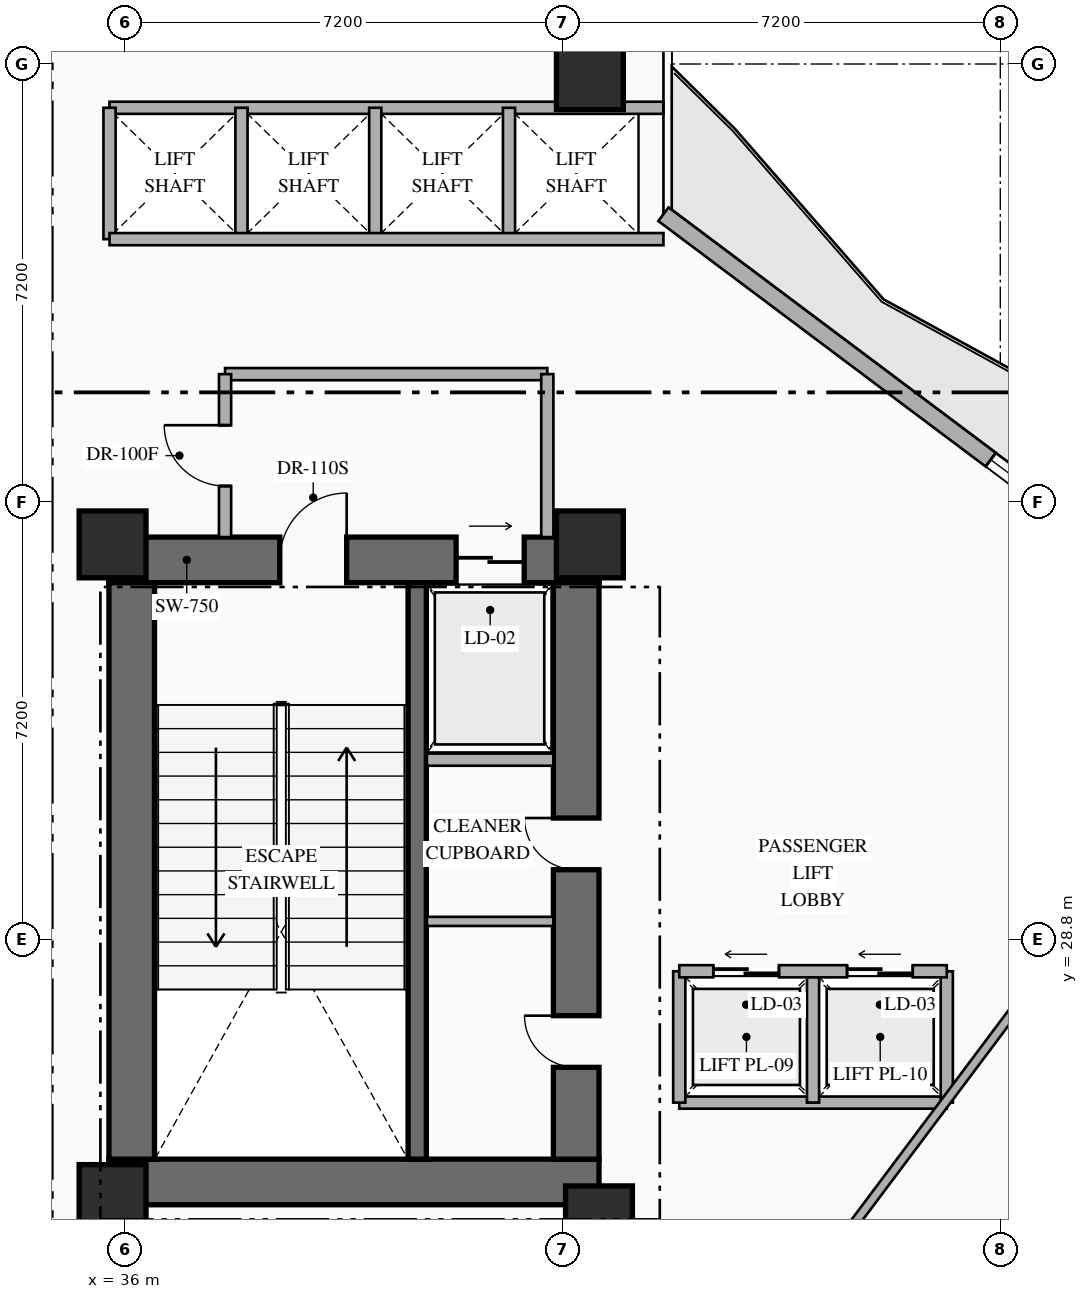
"""IFC4 building model, lengths in metres.
Left out: names, types, materials, properties, quantities, classifications, styles, units other than length and angle.
Written with IfcOpenShell. Run it as: python <this file> out.ifc"""

import sys

from ifc_helpers import new_model, si_unit, direction, frame, frame_2d, origin, origin_2d, place, context, subcontext, project, spatial, rectangle, extrude, element, fill, save


model = new_model("IFC4")
c1 = context("Model", 3, precision=1e-05, world=origin(), true_north=direction((0.0, 1.0)))
c2 = subcontext(c1, "Body", "Model", "MODEL_VIEW")
j1 = project(units=[si_unit("LENGTHUNIT", "METRE"), si_unit("PLANEANGLEUNIT", "RADIAN")], contexts=[c1])
p1 = place(None, origin())
s1 = spatial("IfcSite", under=j1, at=p1, CompositionType="ELEMENT")
p2 = place(p1, origin())
s2 = spatial("IfcBuilding", under=s1, at=p2, CompositionType="ELEMENT")
p3 = place(p2, frame((0.0, 0.0, 32.1)))
s3 = spatial("IfcBuildingStorey", under=s2, at=p3, CompositionType="ELEMENT", Elevation=32.1)
p4 = place(p3, frame((35.74, 24.815, 0.0), z_axis=(0.0, 0.0, 1.0), x_axis=(1.0, 0.0, 0.0)))
e1 = element("IfcWall", 1, at=p4, inside=s3, PredefinedType="SHEAR", context=c2, shape_type="SweptSolid", body=[
    extrude(rectangle(XDim=8.06, YDim=0.75, at=frame_2d((4.03, 0.0))), origin(), (0.0, 0.0, 1.0), 4.5),
])
p5 = place(p3, frame((35.74, 35.045, 0.0), z_axis=(0.0, 0.0, 1.0), x_axis=(1.0, 0.0, 0.0)))
e2 = element("IfcWall", 2, at=p5, inside=s3, PredefinedType="SHEAR", context=c2, shape_type="SweptSolid", body=[
    extrude(rectangle(XDim=8.06, YDim=0.75, at=frame_2d((4.03, 0.0))), origin(), (0.0, 0.0, 1.0), 4.5),
])
p6 = place(p5, frame((2.81, 0.0, 0.0)))
e3 = element("IfcOpeningElement", 3, at=p6, cuts=e2, PredefinedType="OPENING", context=c2, shape_type="SweptSolid", body=[
    extrude(rectangle(XDim=1.1, YDim=2.2, at=frame_2d((0.55, 1.1))), frame((0.0, 0.385, 0.0), z_axis=(0.0, -1.0, 0.0), x_axis=(1.0, 0.0, 0.0)), (0.0, 0.0, 1.0), 0.77),
])
p7 = place(p5, frame((5.71, 0.0, 0.0)))
e4 = element("IfcOpeningElement", 4, at=p7, cuts=e2, PredefinedType="OPENING", context=c2, shape_type="SweptSolid", body=[
    extrude(rectangle(XDim=1.12, YDim=2.15, at=frame_2d((0.56, 1.075))), frame((0.0, 0.385, 0.0), z_axis=(0.0, -1.0, 0.0), x_axis=(1.0, 0.0, 0.0)), (0.0, 0.0, 1.0), 0.77),
])
p8 = place(p3, frame((36.115, 25.19, 0.0), z_axis=(0.0, 0.0, 1.0), x_axis=(0.0, 1.0, 0.0)))
e5 = element("IfcWall", 5, at=p8, inside=s3, PredefinedType="SHEAR", context=c2, shape_type="SweptSolid", body=[
    extrude(rectangle(XDim=9.48, YDim=0.75, at=frame_2d((4.74, 0.0))), origin(), (0.0, 0.0, 1.0), 4.5),
])
p9 = place(p3, frame((43.425, 25.19, 0.0), z_axis=(0.0, 0.0, 1.0), x_axis=(0.0, 1.0, 0.0)))
e6 = element("IfcWall", 6, at=p9, inside=s3, PredefinedType="SHEAR", context=c2, shape_type="SweptSolid", body=[
    extrude(rectangle(XDim=9.48, YDim=0.75, at=frame_2d((4.74, 0.0))), origin(), (0.0, 0.0, 1.0), 4.5),
])
p10 = place(p9, frame((1.51, 0.0, 0.0)))
e7 = element("IfcOpeningElement", 7, at=p10, cuts=e6, PredefinedType="OPENING", context=c2, shape_type="SweptSolid", body=[
    extrude(rectangle(XDim=0.85, YDim=2.08, at=frame_2d((0.425, 1.04))), frame((0.0, 0.385, 0.0), z_axis=(0.0, -1.0, 0.0), x_axis=(1.0, 0.0, 0.0)), (0.0, 0.0, 1.0), 0.77),
])
p11 = place(p9, frame((4.76, 0.0, 0.0)))
e8 = element("IfcOpeningElement", 8, at=p11, cuts=e6, PredefinedType="OPENING", context=c2, shape_type="SweptSolid", body=[
    extrude(rectangle(XDim=0.85, YDim=2.08, at=frame_2d((0.425, 1.04))), frame((0.0, 0.385, 0.0), z_axis=(0.0, -1.0, 0.0), x_axis=(1.0, 0.0, 0.0)), (0.0, 0.0, 1.0), 0.77),
])
p12 = place(p3, frame((40.81, 25.19, 0.0), z_axis=(0.0, 0.0, 1.0), x_axis=(0.0, 1.0, 0.0)))
e9 = element("IfcWall", 9, at=p12, inside=s3, PredefinedType="SHEAR", context=c2, shape_type="SweptSolid", body=[
    extrude(rectangle(XDim=9.48, YDim=0.3, at=frame_2d((4.74, 0.0))), origin(), (0.0, 0.0, 1.0), 4.5),
])
for number, where, z_axis, x_axis in (
    (10, (35.8, 24.55, 0.0), (0.0, 0.0, 1.0), (1.0, 0.0, 0.0)),
    (11, (43.8, 24.2, 0.0), (0.0, 0.0, 1.0), (1.0, 0.0, 0.0)),
    (12, (35.8, 35.3, 0.0), (0.0, 0.0, 1.0), (1.0, 0.0, 0.0)),
    (13, (43.65, 35.3, 0.0), (0.0, 0.0, 1.0), (1.0, 0.0, 0.0)),
    (14, (43.65, 43.0, 0.0), (0.0, 0.0, 1.0), (1.0, 0.0, 0.0)),
):
    element("IfcColumn", number, at=place(p3, frame(where, z_axis=z_axis, x_axis=x_axis)), inside=s3, PredefinedType="COLUMN", context=c2, shape_type="SweptSolid", body=[
        extrude(rectangle(XDim=1.1, YDim=1.1, at=origin_2d()), origin(), (0.0, 0.0, 1.0), 4.5),
    ])
p13 = place(p3, frame((44.86, 40.73, 0.0), z_axis=(0.0, 0.0, 1.0), x_axis=(0.800006902154, -0.599990797017, 0.0)))
e15 = element("IfcWall", 15, at=p13, inside=s3, PredefinedType="STANDARD", context=c2, shape_type="SweptSolid", body=[
    extrude(rectangle(XDim=29.712, YDim=0.28, at=frame_2d((14.856, 0.0))), origin(), (0.0, 0.0, 1.0), 4.28),
])
p14 = place(p13, frame((14.249, 0.0, 0.0)))
e16 = element("IfcOpeningElement", 16, at=p14, cuts=e15, PredefinedType="OPENING", context=c2, shape_type="SweptSolid", body=[
    extrude(rectangle(XDim=1.1, YDim=2.2, at=frame_2d((0.55, 1.1))), frame((0.0, 0.15, 0.0), z_axis=(0.0, -1.0, 0.0), x_axis=(1.0, 0.0, 0.0)), (0.0, 0.0, 1.0), 0.3),
])
p15 = place(p13, frame((6.728, 0.0, 0.85)))
e17 = element("IfcOpeningElement", 17, at=p15, cuts=e15, PredefinedType="OPENING", context=c2, shape_type="SweptSolid", body=[
    extrude(rectangle(XDim=1.4, YDim=1.8, at=frame_2d((0.7, 0.9))), frame((0.0, 0.15, 0.0), z_axis=(0.0, -1.0, 0.0), x_axis=(1.0, 0.0, 0.0)), (0.0, 0.0, 1.0), 0.3),
])
p16 = place(p13, frame((21.584, 0.0, 0.85)))
e18 = element("IfcOpeningElement", 18, at=p16, cuts=e15, PredefinedType="OPENING", context=c2, shape_type="SweptSolid", body=[
    extrude(rectangle(XDim=1.4, YDim=1.8, at=frame_2d((0.7, 0.9))), frame((0.0, 0.15, 0.0), z_axis=(0.0, -1.0, 0.0), x_axis=(1.0, 0.0, 0.0)), (0.0, 0.0, 1.0), 0.3),
])
p17 = place(p3, frame((40.97, 31.76, 0.0), z_axis=(0.0, 0.0, 1.0), x_axis=(1.0, 0.0, 0.0)))
e19 = element("IfcWall", 19, at=p17, inside=s3, PredefinedType="STANDARD", context=c2, shape_type="SweptSolid", body=[
    extrude(rectangle(XDim=2.08, YDim=0.2, at=frame_2d((1.04, 0.0))), origin(), (0.0, 0.0, 1.0), 4.28),
])
p18 = place(p3, frame((40.97, 29.1, 0.0), z_axis=(0.0, 0.0, 1.0), x_axis=(1.0, 0.0, 0.0)))
e20 = element("IfcWall", 20, at=p18, inside=s3, PredefinedType="PARTITIONING", context=c2, shape_type="SweptSolid", body=[
    extrude(rectangle(XDim=2.08, YDim=0.15, at=frame_2d((1.04, 0.0))), origin(), (0.0, 0.0, 1.0), 4.28),
])
p19 = place(p3, frame((37.65, 38.1, 0.0), z_axis=(0.0, 0.0, 1.0), x_axis=(1.0, 0.0, 0.0)))
e21 = element("IfcWall", 21, at=p19, inside=s3, PredefinedType="STANDARD", context=c2, shape_type="SweptSolid", body=[
    extrude(rectangle(XDim=5.3, YDim=0.2, at=frame_2d((2.65, 0.0))), origin(), (0.0, 0.0, 1.0), 4.28),
])
p20 = place(p3, frame((42.95, 35.42, 0.0), z_axis=(0.0, 0.0, 1.0), x_axis=(0.0, 1.0, 0.0)))
e22 = element("IfcWall", 22, at=p20, inside=s3, PredefinedType="STANDARD", context=c2, shape_type="SweptSolid", body=[
    extrude(rectangle(XDim=2.68, YDim=0.2, at=frame_2d((1.34, 0.0))), origin(), (0.0, 0.0, 1.0), 4.28),
])
p21 = place(p3, frame((37.65, 35.42, 0.0), z_axis=(0.0, 0.0, 1.0), x_axis=(0.0, 1.0, 0.0)))
e23 = element("IfcWall", 23, at=p21, inside=s3, PredefinedType="STANDARD", context=c2, shape_type="SweptSolid", body=[
    extrude(rectangle(XDim=2.68, YDim=0.2, at=frame_2d((1.34, 0.0))), origin(), (0.0, 0.0, 1.0), 4.28),
])
p22 = place(p21, frame((0.84, 0.0, 0.0)))
e24 = element("IfcOpeningElement", 24, at=p22, cuts=e23, PredefinedType="OPENING", context=c2, shape_type="SweptSolid", body=[
    extrude(rectangle(XDim=1.0, YDim=2.2, at=frame_2d((0.5, 1.1))), frame((0.0, 0.11, 0.0), z_axis=(0.0, -1.0, 0.0), x_axis=(1.0, 0.0, 0.0)), (0.0, 0.0, 1.0), 0.22),
])
p23 = place(p3, frame((35.75, 42.48, 0.0), z_axis=(0.0, 0.0, 1.0), x_axis=(1.0, 0.0, 0.0)))
e25 = element("IfcWall", 25, at=p23, inside=s3, PredefinedType="STANDARD", context=c2, shape_type="SweptSolid", body=[
    extrude(rectangle(XDim=9.11, YDim=0.2, at=frame_2d((4.555, 0.0))), origin(), (0.0, 0.0, 1.0), 4.28),
])
for number, where, z_axis, x_axis in (
    (26, (35.75, 40.32, 0.0), (0.0, 0.0, 1.0), (0.0, 1.0, 0.0)),
    (27, (37.92, 40.32, 0.0), (0.0, 0.0, 1.0), (0.0, 1.0, 0.0)),
    (28, (40.12, 40.32, 0.0), (0.0, 0.0, 1.0), (0.0, 1.0, 0.0)),
    (29, (42.32, 40.32, 0.0), (0.0, 0.0, 1.0), (0.0, 1.0, 0.0)),
):
    element("IfcWall", number, at=place(p3, frame(where, z_axis=z_axis, x_axis=x_axis)), inside=s3, PredefinedType="STANDARD", context=c2, shape_type="SweptSolid", body=[
        extrude(rectangle(XDim=2.16, YDim=0.2, at=frame_2d((1.08, 0.0))), origin(), (0.0, 0.0, 1.0), 4.28),
    ])
p24 = place(p3, frame((35.75, 40.32, 0.0), z_axis=(0.0, 0.0, 1.0), x_axis=(1.0, 0.0, 0.0)))
e30 = element("IfcWall", 30, at=p24, inside=s3, PredefinedType="STANDARD", context=c2, shape_type="SweptSolid", body=[
    extrude(rectangle(XDim=9.11, YDim=0.2, at=frame_2d((4.555, 0.0))), origin(), (0.0, 0.0, 1.0), 4.28),
])
p25 = place(p3, frame((45.12, 26.12, 0.0), z_axis=(0.0, 0.0, 1.0), x_axis=(1.0, 0.0, 0.0)))
e31 = element("IfcWall", 31, at=p25, inside=s3, PredefinedType="STANDARD", context=c2, shape_type="SweptSolid", body=[
    extrude(rectangle(XDim=4.4, YDim=0.2, at=frame_2d((2.2, 0.0))), origin(), (0.0, 0.0, 1.0), 4.28),
])
for number, where, z_axis, x_axis in (
    (32, (45.12, 26.12, 0.0), (0.0, 0.0, 1.0), (0.0, 1.0, 0.0)),
    (33, (49.52, 26.12, 0.0), (0.0, 0.0, 1.0), (0.0, 1.0, 0.0)),
    (34, (47.32, 26.12, 0.0), (0.0, 0.0, 1.0), (0.0, 1.0, 0.0)),
):
    element("IfcWall", number, at=place(p3, frame(where, z_axis=z_axis, x_axis=x_axis)), inside=s3, PredefinedType="STANDARD", context=c2, shape_type="SweptSolid", body=[
        extrude(rectangle(XDim=2.16, YDim=0.2, at=frame_2d((1.08, 0.0))), origin(), (0.0, 0.0, 1.0), 4.28),
    ])
p26 = place(p3, frame((45.12, 28.28, 0.0), z_axis=(0.0, 0.0, 1.0), x_axis=(1.0, 0.0, 0.0)))
e35 = element("IfcWall", 35, at=p26, inside=s3, PredefinedType="STANDARD", context=c2, shape_type="SweptSolid", body=[
    extrude(rectangle(XDim=4.4, YDim=0.2, at=frame_2d((2.2, 0.0))), origin(), (0.0, 0.0, 1.0), 4.28),
])
p27 = place(p26, frame((0.56, 0.0, 0.0)))
e36 = element("IfcOpeningElement", 36, at=p27, cuts=e35, PredefinedType="OPENING", context=c2, shape_type="SweptSolid", body=[
    extrude(rectangle(XDim=1.08, YDim=2.15, at=frame_2d((0.54, 1.075))), frame((0.0, 0.11, 0.0), z_axis=(0.0, -1.0, 0.0), x_axis=(1.0, 0.0, 0.0)), (0.0, 0.0, 1.0), 0.22),
])
p28 = place(p26, frame((2.76, 0.0, 0.0)))
e37 = element("IfcOpeningElement", 37, at=p28, cuts=e35, PredefinedType="OPENING", context=c2, shape_type="SweptSolid", body=[
    extrude(rectangle(XDim=1.08, YDim=2.15, at=frame_2d((0.54, 1.075))), frame((0.0, 0.11, 0.0), z_axis=(0.0, -1.0, 0.0), x_axis=(1.0, 0.0, 0.0)), (0.0, 0.0, 1.0), 0.22),
])
p29 = place(p3, frame((47.96, 24.08, 0.0), z_axis=(0.0, 0.0, 1.0), x_axis=(0.600010137399, 0.799992396851, 0.0)))
e38 = element("IfcWall", 38, at=p29, inside=s3, PredefinedType="PARTITIONING", context=c2, shape_type="SweptSolid", body=[
    extrude(rectangle(XDim=11.56, YDim=0.15, at=frame_2d((5.78, 0.0))), origin(), (0.0, 0.0, 1.0), 4.28),
])
p30 = place(p15, origin())
e39 = element("IfcWindow", 39, at=p30, inside=s3, PartitioningType="SINGLE_PANEL", PredefinedType="WINDOW", context=c2, shape_type="SweptSolid", body=[
    extrude(rectangle(XDim=1.4, YDim=1.8, at=frame_2d((0.7, 0.9))), frame((0.0, 0.03, 0.0), z_axis=(0.0, -1.0, 0.0), x_axis=(1.0, 0.0, 0.0)), (0.0, 0.0, 1.0), 0.06),
])
fill(e17, e39)
p31 = place(p6, origin())
e40 = element("IfcDoor", 40, at=p31, inside=s3, OperationType="SINGLE_SWING_RIGHT", PredefinedType="DOOR", context=c2, shape_type="SweptSolid", body=[
    extrude(rectangle(XDim=1.1, YDim=2.2, at=frame_2d((0.55, 1.1))), frame((0.0, 0.025, 0.0), z_axis=(0.0, -1.0, 0.0), x_axis=(1.0, 0.0, 0.0)), (0.0, 0.0, 1.0), 0.05),
])
fill(e3, e40)
p32 = place(p7, origin())
e41 = element("IfcDoor", 41, at=p32, inside=s3, OperationType="SLIDING_TO_RIGHT", PredefinedType="USERDEFINED", context=c2, shape_type="SweptSolid", body=[
    extrude(rectangle(XDim=1.12, YDim=2.15, at=frame_2d((0.56, 1.075))), frame((0.0, 0.025, 0.0), z_axis=(0.0, -1.0, 0.0), x_axis=(1.0, 0.0, 0.0)), (0.0, 0.0, 1.0), 0.05),
])
fill(e4, e41)
p33 = place(p10, origin())
e42 = element("IfcDoor", 42, at=p33, inside=s3, OperationType="SINGLE_SWING_RIGHT", PredefinedType="DOOR", context=c2, shape_type="SweptSolid", body=[
    extrude(rectangle(XDim=0.85, YDim=2.08, at=frame_2d((0.425, 1.04))), frame((0.0, 0.025, 0.0), z_axis=(0.0, -1.0, 0.0), x_axis=(1.0, 0.0, 0.0)), (0.0, 0.0, 1.0), 0.05),
])
fill(e7, e42)
p34 = place(p11, origin())
e43 = element("IfcDoor", 43, at=p34, inside=s3, OperationType="SINGLE_SWING_RIGHT", PredefinedType="DOOR", context=c2, shape_type="SweptSolid", body=[
    extrude(rectangle(XDim=0.85, YDim=2.08, at=frame_2d((0.425, 1.04))), frame((0.0, 0.025, 0.0), z_axis=(0.0, -1.0, 0.0), x_axis=(1.0, 0.0, 0.0)), (0.0, 0.0, 1.0), 0.05),
])
fill(e8, e43)
p35 = place(p22, origin())
e44 = element("IfcDoor", 44, at=p35, inside=s3, OperationType="SINGLE_SWING_RIGHT", PredefinedType="DOOR", context=c2, shape_type="SweptSolid", body=[
    extrude(rectangle(XDim=1.0, YDim=2.2, at=frame_2d((0.5, 1.1))), frame((0.0, 0.025, 0.0), z_axis=(0.0, -1.0, 0.0), x_axis=(1.0, 0.0, 0.0)), (0.0, 0.0, 1.0), 0.05),
])
fill(e24, e44)
p36 = place(p27, origin())
e45 = element("IfcDoor", 45, at=p36, inside=s3, OperationType="SLIDING_TO_LEFT", PredefinedType="USERDEFINED", context=c2, shape_type="SweptSolid", body=[
    extrude(rectangle(XDim=1.08, YDim=2.15, at=frame_2d((0.54, 1.075))), frame((0.0, 0.025, 0.0), z_axis=(0.0, -1.0, 0.0), x_axis=(1.0, 0.0, 0.0)), (0.0, 0.0, 1.0), 0.05),
])
fill(e36, e45)
p37 = place(p28, origin())
e46 = element("IfcDoor", 46, at=p37, inside=s3, OperationType="SLIDING_TO_LEFT", PredefinedType="USERDEFINED", context=c2, shape_type="SweptSolid", body=[
    extrude(rectangle(XDim=1.08, YDim=2.15, at=frame_2d((0.54, 1.075))), frame((0.0, 0.025, 0.0), z_axis=(0.0, -1.0, 0.0), x_axis=(1.0, 0.0, 0.0)), (0.0, 0.0, 1.0), 0.05),
])
fill(e37, e46)
save(model, sys.argv[1])
